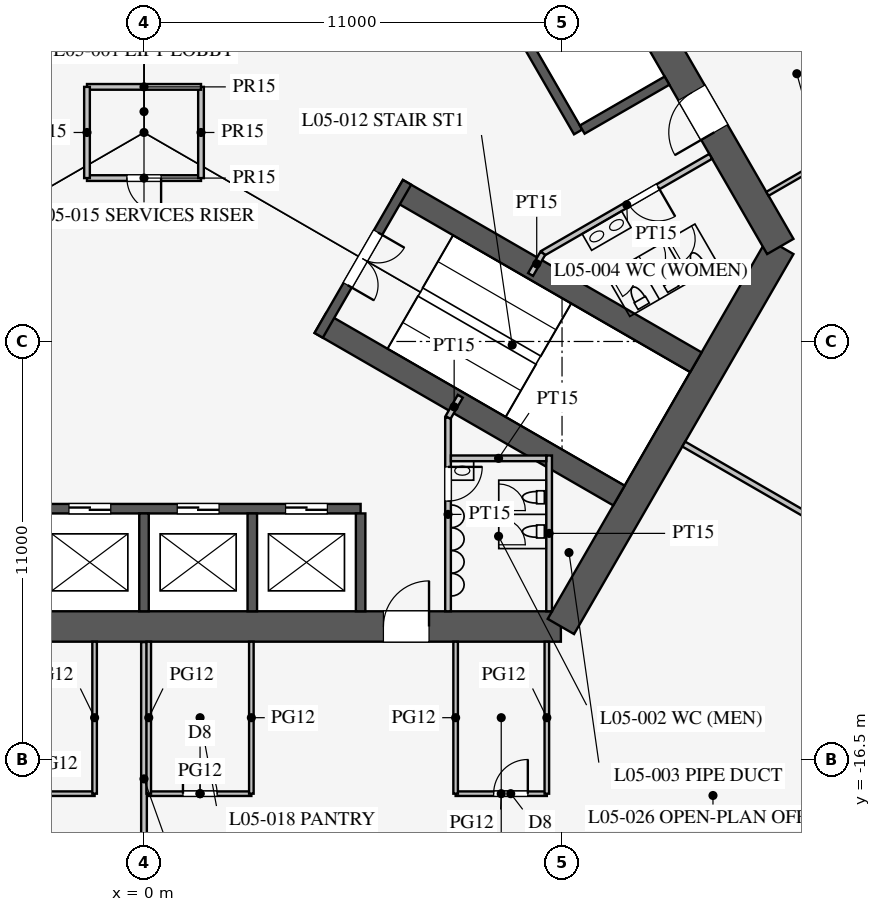
"""IFC4 building model, lengths in metres.
Left out: names, types, materials, properties, quantities, classifications, styles, units other than length and angle.
Written with IfcOpenShell. Run it as: python <this file> out.ifc"""

import sys

from ifc_helpers import new_model, si_unit, direction, frame, frame_2d, origin, place, context, subcontext, project, spatial, rectangle, extrude, element, fill, save


model = new_model("IFC4")
c1 = context("Model", 3, precision=1e-05, world=origin(), true_north=direction((0.0, 1.0)))
c2 = subcontext(c1, "Body", "Model", "MODEL_VIEW")
j1 = project(units=[si_unit("LENGTHUNIT", "METRE"), si_unit("PLANEANGLEUNIT", "RADIAN")], contexts=[c1])
p1 = place(None, origin())
s1 = spatial("IfcSite", under=j1, at=p1, CompositionType="ELEMENT")
p2 = place(p1, origin())
s2 = spatial("IfcBuilding", under=s1, at=p2, CompositionType="ELEMENT")
p3 = place(p2, frame((0.0, 0.0, 24.9)))
s3 = spatial("IfcBuildingStorey", under=s2, at=p3, CompositionType="ELEMENT", Elevation=24.9)
p4 = place(p3, frame((-10.97, -13.0, 0.0), z_axis=(0.0, 0.0, 1.0), x_axis=(1.0, 0.0, 0.0)))
e1 = element("IfcWall", 1, at=p4, inside=s3, PredefinedType="SHEAR", context=c2, shape_type="SweptSolid", body=[
    extrude(rectangle(XDim=21.939, YDim=0.8, at=frame_2d((10.97, 0.0))), origin(), (0.0, 0.0, 1.0), 4.2),
])
p5 = place(p4, frame((17.27, 0.0, 0.0)))
e2 = element("IfcOpeningElement", 2, at=p5, cuts=e1, PredefinedType="OPENING", context=c2, shape_type="SweptSolid", body=[
    extrude(rectangle(XDim=1.2, YDim=2.1, at=frame_2d((0.6, 1.05))), frame((0.0, 0.41, 0.0), z_axis=(0.0, -1.0, 0.0), x_axis=(1.0, 0.0, 0.0)), (0.0, 0.0, 1.0), 0.82),
])
p6 = place(p4, frame((3.47, 0.0, 0.0)))
e3 = element("IfcOpeningElement", 3, at=p6, cuts=e1, PredefinedType="OPENING", context=c2, shape_type="SweptSolid", body=[
    extrude(rectangle(XDim=1.2, YDim=2.1, at=frame_2d((0.6, 1.05))), frame((0.0, 0.41, 0.0), z_axis=(0.0, -1.0, 0.0), x_axis=(1.0, 0.0, 0.0)), (0.0, 0.0, 1.0), 0.82),
])
p7 = place(p3, frame((10.97, -13.0, 0.0), z_axis=(0.0, 0.0, 1.0), x_axis=(0.499995765644, 0.866027848477, 0.0)))
e4 = element("IfcWall", 4, at=p7, inside=s3, PredefinedType="SHEAR", context=c2, shape_type="SweptSolid", body=[
    extrude(rectangle(XDim=11.547, YDim=0.8, at=frame_2d((5.773, 0.0))), origin(), (0.0, 0.0, 1.0), 4.2),
])
p8 = place(p3, frame((16.743, -3.0, 0.0), z_axis=(0.0, 0.0, 1.0), x_axis=(-0.500002442456, 0.866023993627, 0.0)))
e5 = element("IfcWall", 5, at=p8, inside=s3, PredefinedType="SHEAR", context=c2, shape_type="SweptSolid", body=[
    extrude(rectangle(XDim=21.939, YDim=0.8, at=frame_2d((10.97, 0.0))), origin(), (0.0, 0.0, 1.0), 4.2),
])
p9 = place(p8, frame((17.27, 0.0, 0.0)))
e6 = element("IfcOpeningElement", 6, at=p9, cuts=e5, PredefinedType="OPENING", context=c2, shape_type="SweptSolid", body=[
    extrude(rectangle(XDim=1.2, YDim=2.1, at=frame_2d((0.6, 1.05))), frame((0.0, 0.41, 0.0), z_axis=(0.0, -1.0, 0.0), x_axis=(1.0, 0.0, 0.0)), (0.0, 0.0, 1.0), 0.82),
])
p10 = place(p8, frame((3.47, 0.0, 0.0)))
e7 = element("IfcOpeningElement", 7, at=p10, cuts=e5, PredefinedType="OPENING", context=c2, shape_type="SweptSolid", body=[
    extrude(rectangle(XDim=1.2, YDim=2.1, at=frame_2d((0.6, 1.05))), frame((0.0, 0.41, 0.0), z_axis=(0.0, -1.0, 0.0), x_axis=(1.0, 0.0, 0.0)), (0.0, 0.0, 1.0), 0.82),
])
p11 = place(p3, frame((-5.7, -9.9, 0.0), z_axis=(0.0, 0.0, 1.0), x_axis=(1.0, 0.0, 0.0)))
e8 = element("IfcWall", 8, at=p11, inside=s3, PredefinedType="SHEAR", context=c2, shape_type="SweptSolid", body=[
    extrude(rectangle(XDim=11.4, YDim=0.25, at=frame_2d((5.7, 0.0))), origin(), (0.0, 0.0, 1.0), 4.2),
])
p12 = place(p11, frame((0.875, 0.0, 0.0)))
e9 = element("IfcOpeningElement", 9, at=p12, cuts=e8, PredefinedType="OPENING", context=c2, shape_type="SweptSolid", body=[
    extrude(rectangle(XDim=1.1, YDim=2.2, at=frame_2d((0.55, 1.1))), frame((0.0, 0.135, 0.0), z_axis=(0.0, -1.0, 0.0), x_axis=(1.0, 0.0, 0.0)), (0.0, 0.0, 1.0), 0.27),
])
p13 = place(p11, frame((3.725, 0.0, 0.0)))
e10 = element("IfcOpeningElement", 10, at=p13, cuts=e8, PredefinedType="OPENING", context=c2, shape_type="SweptSolid", body=[
    extrude(rectangle(XDim=1.1, YDim=2.2, at=frame_2d((0.55, 1.1))), frame((0.0, 0.135, 0.0), z_axis=(0.0, -1.0, 0.0), x_axis=(1.0, 0.0, 0.0)), (0.0, 0.0, 1.0), 0.27),
])
p14 = place(p11, frame((6.575, 0.0, 0.0)))
e11 = element("IfcOpeningElement", 11, at=p14, cuts=e8, PredefinedType="OPENING", context=c2, shape_type="SweptSolid", body=[
    extrude(rectangle(XDim=1.1, YDim=2.2, at=frame_2d((0.55, 1.1))), frame((0.0, 0.135, 0.0), z_axis=(0.0, -1.0, 0.0), x_axis=(1.0, 0.0, 0.0)), (0.0, 0.0, 1.0), 0.27),
])
p15 = place(p11, frame((9.425, 0.0, 0.0)))
e12 = element("IfcOpeningElement", 12, at=p15, cuts=e8, PredefinedType="OPENING", context=c2, shape_type="SweptSolid", body=[
    extrude(rectangle(XDim=1.1, YDim=2.2, at=frame_2d((0.55, 1.1))), frame((0.0, 0.135, 0.0), z_axis=(0.0, -1.0, 0.0), x_axis=(1.0, 0.0, 0.0)), (0.0, 0.0, 1.0), 0.27),
])
for number, where, z_axis, x_axis in (
    (13, (0.0, -10.025, 0.0), (0.0, 0.0, 1.0), (0.0, -1.0, 0.0)),
    (14, (2.85, -10.025, 0.0), (0.0, 0.0, 1.0), (0.0, -1.0, 0.0)),
    (15, (5.7, -10.025, 0.0), (0.0, 0.0, 1.0), (0.0, -1.0, 0.0)),
):
    element("IfcWall", number, at=place(p3, frame(where, z_axis=z_axis, x_axis=x_axis)), inside=s3, PredefinedType="SHEAR", context=c2, shape_type="SweptSolid", body=[
        extrude(rectangle(XDim=2.575, YDim=0.25, at=frame_2d((1.288, 0.0))), origin(), (0.0, 0.0, 1.0), 4.2),
    ])
p16 = place(p3, frame((11.424, 0.014, 0.0), z_axis=(0.0, 0.0, 1.0), x_axis=(-0.500001763848, 0.866024385424, 0.0)))
e16 = element("IfcWall", 16, at=p16, inside=s3, PredefinedType="SHEAR", context=c2, shape_type="SweptSolid", body=[
    extrude(rectangle(XDim=11.4, YDim=0.25, at=frame_2d((5.7, 0.0))), origin(), (0.0, 0.0, 1.0), 4.2),
])
p17 = place(p3, frame((11.532, 0.076, 0.0), z_axis=(0.0, 0.0, 1.0), x_axis=(0.866005588531, 0.500034319456, 0.0)))
e17 = element("IfcWall", 17, at=p17, inside=s3, PredefinedType="SHEAR", context=c2, shape_type="SweptSolid", body=[
    extrude(rectangle(XDim=2.575, YDim=0.25, at=frame_2d((1.288, 0.0))), origin(), (0.0, 0.0, 1.0), 4.2),
])
for number, where, z_axis, x_axis in (
    (18, (4.638, -5.016, 0.0), (0.0, 0.0, 1.0), (0.866, -0.5, 0.0)),
    (19, (6.663, -1.509, 0.0), (0.0, 0.0, 1.0), (0.866, -0.5, 0.0)),
):
    element("IfcWall", number, at=place(p3, frame(where, z_axis=z_axis, x_axis=x_axis)), inside=s3, PredefinedType="SHEAR", context=c2, shape_type="SweptSolid", body=[
        extrude(rectangle(XDim=9.075, YDim=0.6, at=frame_2d((4.538, 0.0))), origin(), (0.0, 0.0, 1.0), 4.2),
    ])
p18 = place(p3, frame((4.597, -5.339, 0.0), z_axis=(0.0, 0.0, 1.0), x_axis=(0.499984536904, 0.866034331223, 0.0)))
e20 = element("IfcWall", 20, at=p18, inside=s3, PredefinedType="SHEAR", context=c2, shape_type="SweptSolid", body=[
    extrude(rectangle(XDim=4.65, YDim=0.25, at=frame_2d((2.325, 0.0))), origin(), (0.0, 0.0, 1.0), 4.2),
])
p19 = place(p18, frame((1.525, 0.0, 0.0)))
e21 = element("IfcOpeningElement", 21, at=p19, cuts=e20, PredefinedType="OPENING", context=c2, shape_type="SweptSolid", body=[
    extrude(rectangle(XDim=1.6, YDim=2.1, at=frame_2d((0.8, 1.05))), frame((0.0, 0.135, 0.0), z_axis=(0.0, -1.0, 0.0), x_axis=(1.0, 0.0, 0.0)), (0.0, 0.0, 1.0), 0.27),
])
p20 = place(p3, frame((8.0, -7.5, 0.0), z_axis=(0.0, 0.0, 1.0), x_axis=(0.0, -1.0, 0.0)))
e22 = element("IfcWall", 22, at=p20, inside=s3, PredefinedType="PARTITIONING", context=c2, shape_type="SweptSolid", body=[
    extrude(rectangle(XDim=5.1, YDim=0.15, at=frame_2d((2.55, 0.0))), origin(), (0.0, 0.0, 1.0), 4.0),
])
p21 = place(p20, frame((1.3, 0.0, 0.0)))
e23 = element("IfcOpeningElement", 23, at=p21, cuts=e22, PredefinedType="OPENING", context=c2, shape_type="SweptSolid", body=[
    extrude(rectangle(XDim=0.9, YDim=2.1, at=frame_2d((0.45, 1.05))), frame((0.0, 0.085, 0.0), z_axis=(0.0, -1.0, 0.0), x_axis=(1.0, 0.0, 0.0)), (0.0, 0.0, 1.0), 0.17),
])
p22 = place(p3, frame((10.495, -3.178, 0.0), z_axis=(0.0, 0.0, 1.0), x_axis=(0.86602216432, 0.500005610874, 0.0)))
e24 = element("IfcWall", 24, at=p22, inside=s3, PredefinedType="PARTITIONING", context=c2, shape_type="SweptSolid", body=[
    extrude(rectangle(XDim=5.1, YDim=0.15, at=frame_2d((2.55, 0.0))), origin(), (0.0, 0.0, 1.0), 4.0),
])
p23 = place(p22, frame((2.6, 0.0, 0.0)))
e25 = element("IfcOpeningElement", 25, at=p23, cuts=e24, PredefinedType="OPENING", context=c2, shape_type="SweptSolid", body=[
    extrude(rectangle(XDim=0.9, YDim=2.1, at=frame_2d((0.45, 1.05))), frame((0.0, 0.085, 0.0), z_axis=(0.0, -1.0, 0.0), x_axis=(1.0, 0.0, 0.0)), (0.0, 0.0, 1.0), 0.17),
])
for number, where, z_axis, x_axis in (
    (26, (8.0, -7.5, 0.0), (0.0, 0.0, 1.0), (0.5, 0.866, 0.0)),
    (27, (10.495, -3.178, 0.0), (0.0, 0.0, 1.0), (-0.5, -0.866, 0.0)),
):
    element("IfcWall", number, at=place(p3, frame(where, z_axis=z_axis, x_axis=x_axis)), inside=s3, PredefinedType="PARTITIONING", context=c2, shape_type="SweptSolid", body=[
        extrude(rectangle(XDim=0.645, YDim=0.15, at=frame_2d((0.323, 0.0))), origin(), (0.0, 0.0, 1.0), 4.0),
    ])
p24 = place(p3, frame((10.66, -8.5, 0.0), z_axis=(0.0, 0.0, 1.0), x_axis=(0.0, -1.0, 0.0)))
e28 = element("IfcWall", 28, at=p24, inside=s3, PredefinedType="PARTITIONING", context=c2, shape_type="SweptSolid", body=[
    extrude(rectangle(XDim=4.1, YDim=0.15, at=frame_2d((2.05, 0.0))), origin(), (0.0, 0.0, 1.0), 4.0),
])
p25 = place(p3, frame((8.075, -8.575, 0.0), z_axis=(0.0, 0.0, 1.0), x_axis=(1.0, 0.0, 0.0)))
e29 = element("IfcWall", 29, at=p25, inside=s3, PredefinedType="PARTITIONING", context=c2, shape_type="SweptSolid", body=[
    extrude(rectangle(XDim=2.51, YDim=0.15, at=frame_2d((1.255, 0.0))), origin(), (0.0, 0.0, 1.0), 4.0),
])
p26 = place(p3, frame((-1.5, -1.2, 0.0), z_axis=(0.0, 0.0, 1.0), x_axis=(1.0, 0.0, 0.0)))
e30 = element("IfcWall", 30, at=p26, inside=s3, PredefinedType="PARTITIONING", context=c2, shape_type="SweptSolid", body=[
    extrude(rectangle(XDim=3.0, YDim=0.15, at=frame_2d((1.5, 0.0))), origin(), (0.0, 0.0, 1.0), 4.0),
])
p27 = place(p26, frame((1.05, 0.0, 0.0)))
e31 = element("IfcOpeningElement", 31, at=p27, cuts=e30, PredefinedType="OPENING", context=c2, shape_type="SweptSolid", body=[
    extrude(rectangle(XDim=0.9, YDim=2.1, at=frame_2d((0.45, 1.05))), frame((0.0, 0.085, 0.0), z_axis=(0.0, -1.0, 0.0), x_axis=(1.0, 0.0, 0.0)), (0.0, 0.0, 1.0), 0.17),
])
p28 = place(p3, frame((1.5, -1.2, 0.0), z_axis=(0.0, 0.0, 1.0), x_axis=(0.0, 1.0, 0.0)))
e32 = element("IfcWall", 32, at=p28, inside=s3, PredefinedType="PARTITIONING", context=c2, shape_type="SweptSolid", body=[
    extrude(rectangle(XDim=2.4, YDim=0.15, at=frame_2d((1.2, 0.0))), origin(), (0.0, 0.0, 1.0), 4.0),
])
p29 = place(p3, frame((1.5, 1.2, 0.0), z_axis=(0.0, 0.0, 1.0), x_axis=(-1.0, 0.0, 0.0)))
e33 = element("IfcWall", 33, at=p29, inside=s3, PredefinedType="PARTITIONING", context=c2, shape_type="SweptSolid", body=[
    extrude(rectangle(XDim=3.0, YDim=0.15, at=frame_2d((1.5, 0.0))), origin(), (0.0, 0.0, 1.0), 4.0),
])
p30 = place(p3, frame((-1.5, 1.2, 0.0), z_axis=(0.0, 0.0, 1.0), x_axis=(0.0, -1.0, 0.0)))
e34 = element("IfcWall", 34, at=p30, inside=s3, PredefinedType="PARTITIONING", context=c2, shape_type="SweptSolid", body=[
    extrude(rectangle(XDim=2.4, YDim=0.15, at=frame_2d((1.2, 0.0))), origin(), (0.0, 0.0, 1.0), 4.0),
])
p31 = place(p3, frame((14.203, -8.2, 0.0), z_axis=(0.0, 0.0, 1.0), x_axis=(0.866024965723, -0.500000758745, 0.0)))
e35 = element("IfcWall", 35, at=p31, inside=s3, PredefinedType="PARTITIONING", context=c2, shape_type="SweptSolid", body=[
    extrude(rectangle(XDim=18.25, YDim=0.15, at=frame_2d((9.125, 0.0))), origin(), (0.0, 0.0, 1.0), 2.3),
])
p32 = place(p3, frame((0.0, -13.41, 0.0), z_axis=(0.0, 0.0, 1.0), x_axis=(0.0, -1.0, 0.0)))
e36 = element("IfcWall", 36, at=p32, inside=s3, PredefinedType="PARTITIONING", context=c2, shape_type="SweptSolid", body=[
    extrude(rectangle(XDim=12.759, YDim=0.15, at=frame_2d((6.379, 0.0))), origin(), (0.0, 0.0, 1.0), 3.2),
])
p33 = place(p3, frame((0.125, -17.4, 0.0), z_axis=(0.0, 0.0, 1.0), x_axis=(1.0, 0.0, 0.0)))
e37 = element("IfcWall", 37, at=p33, inside=s3, PredefinedType="PARTITIONING", context=c2, shape_type="SweptSolid", body=[
    extrude(rectangle(XDim=2.7, YDim=0.12, at=frame_2d((1.35, 0.0))), origin(), (0.0, 0.0, 1.0), 2.9),
])
p34 = place(p33, frame((0.9, 0.0, 0.15)))
e38 = element("IfcOpeningElement", 38, at=p34, cuts=e37, PredefinedType="OPENING", context=c2, shape_type="SweptSolid", body=[
    extrude(rectangle(XDim=0.9, YDim=2.1, at=frame_2d((0.45, 1.05))), frame((0.0, 0.07, 0.0), z_axis=(0.0, -1.0, 0.0), x_axis=(1.0, 0.0, 0.0)), (0.0, 0.0, 1.0), 0.14),
])
p35 = place(p3, frame((8.2, -17.4, 0.0), z_axis=(0.0, 0.0, 1.0), x_axis=(1.0, 0.0, 0.0)))
e39 = element("IfcWall", 39, at=p35, inside=s3, PredefinedType="PARTITIONING", context=c2, shape_type="SweptSolid", body=[
    extrude(rectangle(XDim=2.4, YDim=0.12, at=frame_2d((1.2, 0.0))), origin(), (0.0, 0.0, 1.0), 2.9),
])
p36 = place(p35, frame((1.0, 0.0, 0.15)))
e40 = element("IfcOpeningElement", 40, at=p36, cuts=e39, PredefinedType="OPENING", context=c2, shape_type="SweptSolid", body=[
    extrude(rectangle(XDim=0.9, YDim=2.1, at=frame_2d((0.45, 1.05))), frame((0.0, 0.07, 0.0), z_axis=(0.0, -1.0, 0.0), x_axis=(1.0, 0.0, 0.0)), (0.0, 0.0, 1.0), 0.14),
])
p37 = place(p3, frame((-4.9, -17.4, 0.0), z_axis=(0.0, 0.0, 1.0), x_axis=(1.0, 0.0, 0.0)))
e41 = element("IfcWall", 41, at=p37, inside=s3, PredefinedType="PARTITIONING", context=c2, shape_type="SweptSolid", body=[
    extrude(rectangle(XDim=3.6, YDim=0.12, at=frame_2d((1.8, 0.0))), origin(), (0.0, 0.0, 1.0), 2.9),
])
p38 = place(p37, frame((1.3, 0.0, 0.15)))
e42 = element("IfcOpeningElement", 42, at=p38, cuts=e41, PredefinedType="OPENING", context=c2, shape_type="SweptSolid", body=[
    extrude(rectangle(XDim=1.0, YDim=2.1, at=frame_2d((0.5, 1.05))), frame((0.0, 0.07, 0.0), z_axis=(0.0, -1.0, 0.0), x_axis=(1.0, 0.0, 0.0)), (0.0, 0.0, 1.0), 0.14),
])
for number, where, z_axis, x_axis in (
    (43, (0.125, -13.4, 0.0), (0.0, 0.0, 1.0), (0.0, -1.0, 0.0)),
    (44, (10.6, -13.4, 0.0), (0.0, 0.0, 1.0), (0.0, -1.0, 0.0)),
    (45, (2.825, -13.4, 0.0), (0.0, 0.0, 1.0), (0.0, -1.0, 0.0)),
    (46, (8.2, -13.4, 0.0), (0.0, 0.0, 1.0), (0.0, -1.0, 0.0)),
    (47, (-1.3, -13.4, 0.0), (0.0, 0.0, 1.0), (0.0, -1.0, 0.0)),
):
    element("IfcWall", number, at=place(p3, frame(where, z_axis=z_axis, x_axis=x_axis)), inside=s3, PredefinedType="PARTITIONING", context=c2, shape_type="SweptSolid", body=[
        extrude(rectangle(XDim=4.0, YDim=0.12, at=frame_2d((2.0, 0.0))), origin(), (0.0, 0.0, 1.0), 2.9),
    ])
p39 = place(p3, frame((16.405, -1.614, 0.0), z_axis=(0.0, 0.0, 1.0), x_axis=(0.866017533419, 0.500013631625, 0.0)))
e48 = element("IfcWall", 48, at=p39, inside=s3, PredefinedType="PARTITIONING", context=c2, shape_type="SweptSolid", body=[
    extrude(rectangle(XDim=4.5, YDim=0.12, at=frame_2d((2.25, 0.0))), origin(), (0.0, 0.0, 1.0), 2.9),
])
p40 = place(p3, frame((-0.016, 30.491, 0.0), z_axis=(0.0, 0.0, 1.0), x_axis=(-0.50000091641, -0.866024874695, 0.0)))
e49 = element("IfcWall", 49, at=p40, inside=s3, PredefinedType="PARTITIONING", context=c2, shape_type="SweptSolid", body=[
    extrude(rectangle(XDim=52.796, YDim=0.12, at=frame_2d((26.398, 0.0))), origin(), (0.0, 0.0, 1.0), 2.9),
])
p41 = place(p40, frame((10.2, 0.0, 0.15)))
e50 = element("IfcOpeningElement", 50, at=p41, cuts=e49, PredefinedType="OPENING", context=c2, shape_type="SweptSolid", body=[
    extrude(rectangle(XDim=1.8, YDim=2.1, at=frame_2d((0.9, 1.05))), frame((0.0, 0.07, 0.0), z_axis=(0.0, -1.0, 0.0), x_axis=(1.0, 0.0, 0.0)), (0.0, 0.0, 1.0), 0.14),
])
p42 = place(p40, frame((40.8, 0.0, 0.15)))
e51 = element("IfcOpeningElement", 51, at=p42, cuts=e49, PredefinedType="OPENING", context=c2, shape_type="SweptSolid", body=[
    extrude(rectangle(XDim=1.8, YDim=2.1, at=frame_2d((0.9, 1.05))), frame((0.0, 0.07, 0.0), z_axis=(0.0, -1.0, 0.0), x_axis=(1.0, 0.0, 0.0)), (0.0, 0.0, 1.0), 0.14),
])
p43 = place(p21, origin())
e52 = element("IfcDoor", 52, at=p43, inside=s3, OperationType="SINGLE_SWING_LEFT", PredefinedType="DOOR", context=c2, shape_type="SweptSolid", body=[
    extrude(rectangle(XDim=0.9, YDim=2.1, at=frame_2d((0.45, 1.05))), frame((0.0, 0.025, 0.0), z_axis=(0.0, -1.0, 0.0), x_axis=(1.0, 0.0, 0.0)), (0.0, 0.0, 1.0), 0.05),
])
fill(e23, e52)
p44 = place(p23, frame((0.9, 0.0, 0.0), z_axis=(0.0, 0.0, 1.0), x_axis=(-1.0, 0.0, 0.0)))
e53 = element("IfcDoor", 53, at=p44, inside=s3, OperationType="SINGLE_SWING_LEFT", PredefinedType="DOOR", context=c2, shape_type="SweptSolid", body=[
    extrude(rectangle(XDim=0.9, YDim=2.1, at=frame_2d((0.45, 1.05))), frame((0.0, 0.025, 0.0), z_axis=(0.0, -1.0, 0.0), x_axis=(1.0, 0.0, 0.0)), (0.0, 0.0, 1.0), 0.05),
])
fill(e25, e53)
p45 = place(p27, frame((0.9, 0.0, 0.0), z_axis=(0.0, 0.0, 1.0), x_axis=(-1.0, 0.0, 0.0)))
e54 = element("IfcDoor", 54, at=p45, inside=s3, OperationType="SINGLE_SWING_LEFT", PredefinedType="DOOR", context=c2, shape_type="SweptSolid", body=[
    extrude(rectangle(XDim=0.9, YDim=2.1, at=frame_2d((0.45, 1.05))), frame((0.0, 0.025, 0.0), z_axis=(0.0, -1.0, 0.0), x_axis=(1.0, 0.0, 0.0)), (0.0, 0.0, 1.0), 0.05),
])
fill(e31, e54)
p46 = place(p19, frame((1.6, 0.0, 0.0), z_axis=(0.0, 0.0, 1.0), x_axis=(-1.0, 0.0, 0.0)))
e55 = element("IfcDoor", 55, at=p46, inside=s3, OperationType="DOUBLE_DOOR_SINGLE_SWING", PredefinedType="DOOR", context=c2, shape_type="SweptSolid", body=[
    extrude(rectangle(XDim=1.6, YDim=2.1, at=frame_2d((0.8, 1.05))), frame((0.0, 0.025, 0.0), z_axis=(0.0, -1.0, 0.0), x_axis=(1.0, 0.0, 0.0)), (0.0, 0.0, 1.0), 0.05),
])
fill(e21, e55)
p47 = place(p5, origin())
e56 = element("IfcDoor", 56, at=p47, inside=s3, OperationType="SINGLE_SWING_RIGHT", PredefinedType="DOOR", context=c2, shape_type="SweptSolid", body=[
    extrude(rectangle(XDim=1.2, YDim=2.1, at=frame_2d((0.6, 1.05))), frame((0.0, 0.025, 0.0), z_axis=(0.0, -1.0, 0.0), x_axis=(1.0, 0.0, 0.0)), (0.0, 0.0, 1.0), 0.05),
])
fill(e2, e56)
p48 = place(p10, origin())
e57 = element("IfcDoor", 57, at=p48, inside=s3, OperationType="SINGLE_SWING_LEFT", PredefinedType="DOOR", context=c2, shape_type="SweptSolid", body=[
    extrude(rectangle(XDim=1.2, YDim=2.1, at=frame_2d((0.6, 1.05))), frame((0.0, 0.025, 0.0), z_axis=(0.0, -1.0, 0.0), x_axis=(1.0, 0.0, 0.0)), (0.0, 0.0, 1.0), 0.05),
])
fill(e7, e57)
p49 = place(p34, origin())
e58 = element("IfcDoor", 58, at=p49, inside=s3, OperationType="SINGLE_SWING_LEFT", PredefinedType="DOOR", context=c2, shape_type="SweptSolid", body=[
    extrude(rectangle(XDim=0.9, YDim=2.1, at=frame_2d((0.45, 1.05))), frame((0.0, 0.025, 0.0), z_axis=(0.0, -1.0, 0.0), x_axis=(1.0, 0.0, 0.0)), (0.0, 0.0, 1.0), 0.05),
])
fill(e38, e58)
p50 = place(p36, origin())
e59 = element("IfcDoor", 59, at=p50, inside=s3, OperationType="SINGLE_SWING_RIGHT", PredefinedType="DOOR", context=c2, shape_type="SweptSolid", body=[
    extrude(rectangle(XDim=0.9, YDim=2.1, at=frame_2d((0.45, 1.05))), frame((0.0, 0.025, 0.0), z_axis=(0.0, -1.0, 0.0), x_axis=(1.0, 0.0, 0.0)), (0.0, 0.0, 1.0), 0.05),
])
fill(e40, e59)
p51 = place(p13, origin())
e60 = element("IfcDoor", 60, at=p51, inside=s3, OperationType="DOUBLE_DOOR_SLIDING", PredefinedType="DOOR", context=c2, shape_type="SweptSolid", body=[
    extrude(rectangle(XDim=1.1, YDim=2.2, at=frame_2d((0.55, 1.1))), frame((0.0, 0.025, 0.0), z_axis=(0.0, -1.0, 0.0), x_axis=(1.0, 0.0, 0.0)), (0.0, 0.0, 1.0), 0.05),
])
fill(e10, e60)
p52 = place(p14, origin())
e61 = element("IfcDoor", 61, at=p52, inside=s3, OperationType="DOUBLE_DOOR_SLIDING", PredefinedType="DOOR", context=c2, shape_type="SweptSolid", body=[
    extrude(rectangle(XDim=1.1, YDim=2.2, at=frame_2d((0.55, 1.1))), frame((0.0, 0.025, 0.0), z_axis=(0.0, -1.0, 0.0), x_axis=(1.0, 0.0, 0.0)), (0.0, 0.0, 1.0), 0.05),
])
fill(e11, e61)
p53 = place(p15, origin())
e62 = element("IfcDoor", 62, at=p53, inside=s3, OperationType="DOUBLE_DOOR_SLIDING", PredefinedType="DOOR", context=c2, shape_type="SweptSolid", body=[
    extrude(rectangle(XDim=1.1, YDim=2.2, at=frame_2d((0.55, 1.1))), frame((0.0, 0.025, 0.0), z_axis=(0.0, -1.0, 0.0), x_axis=(1.0, 0.0, 0.0)), (0.0, 0.0, 1.0), 0.05),
])
fill(e12, e62)
save(model, sys.argv[1])
